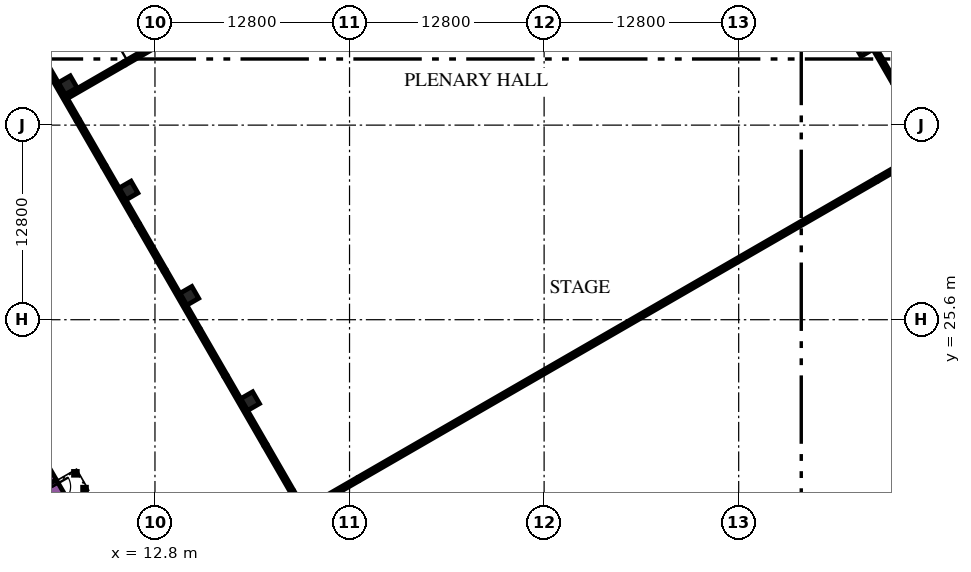
"""IFC4 building model, lengths in metres.
Left out: names, types, materials, properties, quantities, classifications, styles, units other than length and angle.
Written with IfcOpenShell. Run it as: python <this file> out.ifc"""

import sys

from ifc_helpers import new_model, si_unit, direction, frame, frame_2d, origin, origin_2d, place, context, subcontext, project, spatial, rectangle, extrude, element, fill, save


model = new_model("IFC4")
c1 = context("Model", 3, precision=1e-05, world=origin(), true_north=direction((0.0, 1.0)))
c2 = subcontext(c1, "Body", "Model", "MODEL_VIEW")
j1 = project(units=[si_unit("LENGTHUNIT", "METRE"), si_unit("PLANEANGLEUNIT", "RADIAN")], contexts=[c1])
p1 = place(None, origin())
s1 = spatial("IfcSite", under=j1, at=p1, CompositionType="ELEMENT")
p2 = place(p1, origin())
s2 = spatial("IfcBuilding", under=s1, at=p2, CompositionType="ELEMENT")
p3 = place(p2, origin())
s3 = spatial("IfcBuildingStorey", under=s2, at=p3, CompositionType="ELEMENT", Elevation=0.0)
p4 = place(p3, frame((19.355, 12.329, 2.1), z_axis=(-0.200269190983, 0.336813845705, 0.920026458578), x_axis=(-0.859534207637, -0.511078218966, 0.0)))
e1 = element("IfcColumn", 1, at=p4, inside=s3, PredefinedType="COLUMN", context=c2, shape_type="SweptSolid", body=[
    extrude(rectangle(XDim=1.8, YDim=1.6, at=origin_2d()), origin(), (0.0, 0.0, 1.0), 17.608),
])
p5 = place(p2, frame((0.0, 0.0, 6.0)))
s4 = spatial("IfcBuildingStorey", under=s2, at=p5, CompositionType="ELEMENT", Elevation=6.0)
for number, where, z_axis, x_axis in (
    (2, (19.061, 20.242, 0.0), (0.0, 0.0, 1.0), (-0.5, 0.866, 0.0)),
    (3, (59.417, 43.542, 0.0), (0.0, 0.0, 1.0), (-0.5, 0.866, 0.0)),
    (4, (15.061, 27.17, 0.0), (0.0, 0.0, 1.0), (-0.5, 0.866, 0.0)),
    (5, (11.061, 34.099, 0.0), (0.0, 0.0, 1.0), (-0.5, 0.866, 0.0)),
    (6, (7.061, 41.027, 0.0), (0.0, 0.0, 1.0), (-0.5, 0.866, 0.0)),
):
    element("IfcColumn", number, at=place(p5, frame(where, z_axis=z_axis, x_axis=x_axis)), inside=s4, PredefinedType="COLUMN", context=c2, shape_type="SweptSolid", body=[
        extrude(rectangle(XDim=0.9, YDim=0.9, at=origin_2d()), origin(), (0.0, 0.0, 1.0), 5.4),
    ])
p6 = place(p5, frame((5.926, 14.836, 0.0), z_axis=(0.0, 0.0, 1.0), x_axis=(-0.500076735116, 0.865981096212, 0.0)))
e7 = element("IfcWall", 7, at=p6, inside=s4, PredefinedType="SOLIDWALL", context=c2, shape_type="SweptSolid", body=[
    extrude(rectangle(XDim=1.094, YDim=0.9, at=frame_2d((0.547, 0.0))), origin(), (0.0, 0.0, 1.0), 5.4),
])
p7 = place(p5, frame((5.926, 14.836, 0.0), z_axis=(0.0, 0.0, 1.0), x_axis=(0.500062241894, -0.865989465428, 0.0)))
e8 = element("IfcWall", 8, at=p7, inside=s4, PredefinedType="SOLIDWALL", context=c2, shape_type="SweptSolid", body=[
    extrude(rectangle(XDim=1.7, YDim=0.9, at=frame_2d((0.85, 0.0))), origin(), (0.0, 0.0, 1.0), 5.4),
])
p8 = place(p7, frame((0.25, 0.0, 0.0)))
e9 = element("IfcOpeningElement", 9, at=p8, cuts=e8, PredefinedType="OPENING", context=c2, shape_type="SweptSolid", body=[
    extrude(rectangle(XDim=1.2, YDim=2.1, at=frame_2d((0.6, 1.05))), frame((0.0, 0.46, 0.0), z_axis=(0.0, -1.0, 0.0), x_axis=(1.0, 0.0, 0.0)), (0.0, 0.0, 1.0), 0.92),
])
p9 = place(p5, frame((23.688, 11.078, 0.0), z_axis=(0.0, 0.0, 1.0), x_axis=(-0.499982597115, 0.866035451112, 0.0)))
e10 = element("IfcWall", 10, at=p9, inside=s4, PredefinedType="SOLIDWALL", context=c2, shape_type="SweptSolid", body=[
    extrude(rectangle(XDim=3.737, YDim=0.25, at=frame_2d((1.869, 0.0))), origin(), (0.0, 0.0, 1.0), 5.1),
])
p10 = place(p5, frame((21.819, 14.314, 0.0), z_axis=(0.0, 0.0, 1.0), x_axis=(-0.499980071345, 0.866036909293, 0.0)))
e11 = element("IfcWall", 11, at=p10, inside=s4, PredefinedType="SOLIDWALL", context=c2, shape_type="SweptSolid", body=[
    extrude(rectangle(XDim=3.5, YDim=0.25, at=frame_2d((1.75, 0.0))), origin(), (0.0, 0.0, 1.0), 5.1),
])
p11 = place(p10, frame((0.25, 0.0, 1.0)))
e12 = element("IfcOpeningElement", 12, at=p11, cuts=e11, PredefinedType="OPENING", context=c2, shape_type="SweptSolid", body=[
    extrude(rectangle(XDim=3.0, YDim=2.8, at=frame_2d((1.5, 1.4))), frame((0.0, 0.135, 0.0), z_axis=(0.0, -1.0, 0.0), x_axis=(1.0, 0.0, 0.0)), (0.0, 0.0, 1.0), 0.27),
])
p12 = place(p5, frame((20.069, 17.345, 0.0), z_axis=(0.0, 0.0, 1.0), x_axis=(-0.50001558016, 0.866016408388, 0.0)))
e13 = element("IfcWall", 13, at=p12, inside=s4, PredefinedType="SOLIDWALL", context=c2, shape_type="SweptSolid", body=[
    extrude(rectangle(XDim=5.263, YDim=0.25, at=frame_2d((2.631, 0.0))), origin(), (0.0, 0.0, 1.0), 5.1),
])
p13 = place(p5, frame((17.438, 21.903, 0.0), z_axis=(0.0, 0.0, 1.0), x_axis=(-0.500010275428, 0.866019471182, 0.0)))
e14 = element("IfcWall", 14, at=p13, inside=s4, PredefinedType="SOLIDWALL", context=c2, shape_type="SweptSolid", body=[
    extrude(rectangle(XDim=3.5, YDim=0.25, at=frame_2d((1.75, 0.0))), origin(), (0.0, 0.0, 1.0), 5.1),
])
p14 = place(p13, frame((0.25, 0.0, 1.0)))
e15 = element("IfcOpeningElement", 15, at=p14, cuts=e14, PredefinedType="OPENING", context=c2, shape_type="SweptSolid", body=[
    extrude(rectangle(XDim=3.0, YDim=2.8, at=frame_2d((1.5, 1.4))), frame((0.0, 0.135, 0.0), z_axis=(0.0, -1.0, 0.0), x_axis=(1.0, 0.0, 0.0)), (0.0, 0.0, 1.0), 0.27),
])
p15 = place(p5, frame((15.688, 24.934, 0.0), z_axis=(0.0, 0.0, 1.0), x_axis=(-0.499990139034, 0.866031096941, 0.0)))
e16 = element("IfcWall", 16, at=p15, inside=s4, PredefinedType="SOLIDWALL", context=c2, shape_type="SweptSolid", body=[
    extrude(rectangle(XDim=4.5, YDim=0.25, at=frame_2d((2.25, 0.0))), origin(), (0.0, 0.0, 1.0), 5.1),
])
p16 = place(p5, frame((13.438, 28.832, 0.0), z_axis=(0.0, 0.0, 1.0), x_axis=(-0.500010275428, 0.866019471182, 0.0)))
e17 = element("IfcWall", 17, at=p16, inside=s4, PredefinedType="SOLIDWALL", context=c2, shape_type="SweptSolid", body=[
    extrude(rectangle(XDim=3.5, YDim=0.25, at=frame_2d((1.75, 0.0))), origin(), (0.0, 0.0, 1.0), 5.1),
])
p17 = place(p16, frame((0.25, 0.0, 1.0)))
e18 = element("IfcOpeningElement", 18, at=p17, cuts=e17, PredefinedType="OPENING", context=c2, shape_type="SweptSolid", body=[
    extrude(rectangle(XDim=3.0, YDim=2.8, at=frame_2d((1.5, 1.4))), frame((0.0, 0.135, 0.0), z_axis=(0.0, -1.0, 0.0), x_axis=(1.0, 0.0, 0.0)), (0.0, 0.0, 1.0), 0.27),
])
p18 = place(p5, frame((11.688, 31.863, 0.0), z_axis=(0.0, 0.0, 1.0), x_axis=(-0.499990705068, 0.866030770149, 0.0)))
e19 = element("IfcWall", 19, at=p18, inside=s4, PredefinedType="SOLIDWALL", context=c2, shape_type="SweptSolid", body=[
    extrude(rectangle(XDim=4.438, YDim=0.25, at=frame_2d((2.219, 0.0))), origin(), (0.0, 0.0, 1.0), 5.1),
])
p19 = place(p5, frame((9.469, 35.706, 0.0), z_axis=(0.0, 0.0, 1.0), x_axis=(-0.500010275428, 0.866019471182, 0.0)))
e20 = element("IfcWall", 20, at=p19, inside=s4, PredefinedType="SOLIDWALL", context=c2, shape_type="SweptSolid", body=[
    extrude(rectangle(XDim=3.5, YDim=0.25, at=frame_2d((1.75, 0.0))), origin(), (0.0, 0.0, 1.0), 5.1),
])
p20 = place(p19, frame((0.25, 0.0, 1.0)))
e21 = element("IfcOpeningElement", 21, at=p20, cuts=e20, PredefinedType="OPENING", context=c2, shape_type="SweptSolid", body=[
    extrude(rectangle(XDim=3.0, YDim=2.8, at=frame_2d((1.5, 1.4))), frame((0.0, 0.135, 0.0), z_axis=(0.0, -1.0, 0.0), x_axis=(1.0, 0.0, 0.0)), (0.0, 0.0, 1.0), 0.27),
])
p21 = place(p5, frame((7.719, 38.737, 0.0), z_axis=(0.0, 0.0, 1.0), x_axis=(-0.500001855621, 0.866024332438, 0.0)))
e22 = element("IfcWall", 22, at=p21, inside=s4, PredefinedType="SOLIDWALL", context=c2, shape_type="SweptSolid", body=[
    extrude(rectangle(XDim=10.312, YDim=0.25, at=frame_2d((5.156, 0.0))), origin(), (0.0, 0.0, 1.0), 5.1),
])
p22 = place(p5, frame((58.79, 45.778, 0.0), z_axis=(0.0, 0.0, 1.0), x_axis=(0.50001558016, -0.866016408388, 0.0)))
e23 = element("IfcWall", 23, at=p22, inside=s4, PredefinedType="SOLIDWALL", context=c2, shape_type="SweptSolid", body=[
    extrude(rectangle(XDim=5.263, YDim=0.25, at=frame_2d((2.631, 0.0))), origin(), (0.0, 0.0, 1.0), 5.1),
])
p23 = place(p5, frame((23.45, 13.539, 0.0), z_axis=(0.0, 0.0, 1.0), x_axis=(0.866035871367, 0.499981869177, 0.0)))
e24 = element("IfcWall", 24, at=p23, inside=s4, PredefinedType="SOLIDWALL", context=c2, shape_type="SweptSolid", body=[
    extrude(rectangle(XDim=3.15, YDim=0.25, at=frame_2d((1.575, 0.0))), origin(), (0.0, 0.0, 1.0), 4.5),
])
p24 = place(p5, frame((26.178, 15.114, 0.0), z_axis=(0.0, 0.0, 1.0), x_axis=(0.866025540551, 0.499999763114, 0.0)))
e25 = element("IfcWall", 25, at=p24, inside=s4, PredefinedType="SOLIDWALL", context=c2, shape_type="SweptSolid", body=[
    extrude(rectangle(XDim=39.4, YDim=0.25, at=frame_2d((19.7, 0.0))), origin(), (0.0, 0.0, 1.0), 10.2),
])
p25 = place(p5, frame((60.3, 34.814, 0.0), z_axis=(0.0, 0.0, 1.0), x_axis=(0.866035871367, 0.499981869177, 0.0)))
e26 = element("IfcWall", 26, at=p25, inside=s4, PredefinedType="SOLIDWALL", context=c2, shape_type="SweptSolid", body=[
    extrude(rectangle(XDim=3.15, YDim=0.25, at=frame_2d((1.575, 0.0))), origin(), (0.0, 0.0, 1.0), 4.5),
])
p26 = place(p5, frame((6.983, 40.26, 0.0), z_axis=(0.0, 0.0, 1.0), x_axis=(0.865994303029, 0.500053864221, 0.0)))
e27 = element("IfcWall", 27, at=p26, inside=s4, PredefinedType="SOLIDWALL", context=c2, shape_type="SweptSolid", body=[
    extrude(rectangle(XDim=4.4, YDim=0.25, at=frame_2d((2.2, 0.0))), origin(), (0.0, 0.0, 1.0), 4.5),
])
p27 = place(p5, frame((10.794, 42.461, 0.0), z_axis=(0.0, 0.0, 1.0), x_axis=(0.866059108428, 0.4999416173, 0.0)))
e28 = element("IfcWall", 28, at=p27, inside=s4, PredefinedType="SOLIDWALL", context=c2, shape_type="SweptSolid", body=[
    extrude(rectangle(XDim=2.7, YDim=0.25, at=frame_2d((1.35, 0.0))), origin(), (0.0, 0.0, 1.0), 4.5),
])
p28 = place(p27, frame((0.25, 0.0, 0.0)))
e29 = element("IfcOpeningElement", 29, at=p28, cuts=e28, PredefinedType="OPENING", context=c2, shape_type="SweptSolid", body=[
    extrude(rectangle(XDim=2.2, YDim=2.1, at=frame_2d((1.1, 1.05))), frame((0.0, 0.135, 0.0), z_axis=(0.0, -1.0, 0.0), x_axis=(1.0, 0.0, 0.0)), (0.0, 0.0, 1.0), 0.27),
])
for number, where, z_axis, x_axis in (
    (30, (8.167, 14.455, 0.0), (0.0, 0.0, 1.0), (1.0, 0.0, 0.0)),
    (31, (7.566, 15.495, 0.0), (0.0, 0.0, 1.0), (1.0, 0.0, 0.0)),
):
    element("IfcColumn", number, at=place(p5, frame(where, z_axis=z_axis, x_axis=x_axis)), inside=s4, PredefinedType="COLUMN", context=c2, shape_type="SweptSolid", body=[
        extrude(rectangle(XDim=0.25, YDim=0.25, at=origin_2d()), origin(), (0.0, 0.0, 1.0), 5.2),
    ])
p29 = place(p8, origin())
e32 = element("IfcDoor", 32, at=p29, inside=s4, OperationType="SINGLE_SWING_LEFT", PredefinedType="DOOR", context=c2, shape_type="SweptSolid", body=[
    extrude(rectangle(XDim=1.2, YDim=2.1, at=frame_2d((0.6, 1.05))), frame((0.0, 0.025, 0.0), z_axis=(0.0, -1.0, 0.0), x_axis=(1.0, 0.0, 0.0)), (0.0, 0.0, 1.0), 0.05),
])
fill(e9, e32)
p30 = place(p11, origin())
e33 = element("IfcWindow", 33, at=p30, inside=s4, PartitioningType="SINGLE_PANEL", PredefinedType="WINDOW", context=c2, shape_type="SweptSolid", body=[
    extrude(rectangle(XDim=3.0, YDim=2.8, at=frame_2d((1.5, 1.4))), frame((0.0, 0.03, 0.0), z_axis=(0.0, -1.0, 0.0), x_axis=(1.0, 0.0, 0.0)), (0.0, 0.0, 1.0), 0.06),
])
fill(e12, e33)
p31 = place(p14, origin())
e34 = element("IfcWindow", 34, at=p31, inside=s4, PartitioningType="SINGLE_PANEL", PredefinedType="WINDOW", context=c2, shape_type="SweptSolid", body=[
    extrude(rectangle(XDim=3.0, YDim=2.8, at=frame_2d((1.5, 1.4))), frame((0.0, 0.03, 0.0), z_axis=(0.0, -1.0, 0.0), x_axis=(1.0, 0.0, 0.0)), (0.0, 0.0, 1.0), 0.06),
])
fill(e15, e34)
p32 = place(p17, origin())
e35 = element("IfcWindow", 35, at=p32, inside=s4, PartitioningType="SINGLE_PANEL", PredefinedType="WINDOW", context=c2, shape_type="SweptSolid", body=[
    extrude(rectangle(XDim=3.0, YDim=2.8, at=frame_2d((1.5, 1.4))), frame((0.0, 0.03, 0.0), z_axis=(0.0, -1.0, 0.0), x_axis=(1.0, 0.0, 0.0)), (0.0, 0.0, 1.0), 0.06),
])
fill(e18, e35)
p33 = place(p20, origin())
e36 = element("IfcWindow", 36, at=p33, inside=s4, PartitioningType="SINGLE_PANEL", PredefinedType="WINDOW", context=c2, shape_type="SweptSolid", body=[
    extrude(rectangle(XDim=3.0, YDim=2.8, at=frame_2d((1.5, 1.4))), frame((0.0, 0.03, 0.0), z_axis=(0.0, -1.0, 0.0), x_axis=(1.0, 0.0, 0.0)), (0.0, 0.0, 1.0), 0.06),
])
fill(e21, e36)
p34 = place(p28, origin())
e37 = element("IfcDoor", 37, at=p34, inside=s4, OperationType="DOUBLE_DOOR_SINGLE_SWING", PredefinedType="DOOR", context=c2, shape_type="SweptSolid", body=[
    extrude(rectangle(XDim=2.2, YDim=2.1, at=frame_2d((1.1, 1.05))), frame((0.0, 0.025, 0.0), z_axis=(0.0, -1.0, 0.0), x_axis=(1.0, 0.0, 0.0)), (0.0, 0.0, 1.0), 0.05),
])
fill(e29, e37)
save(model, sys.argv[1])
